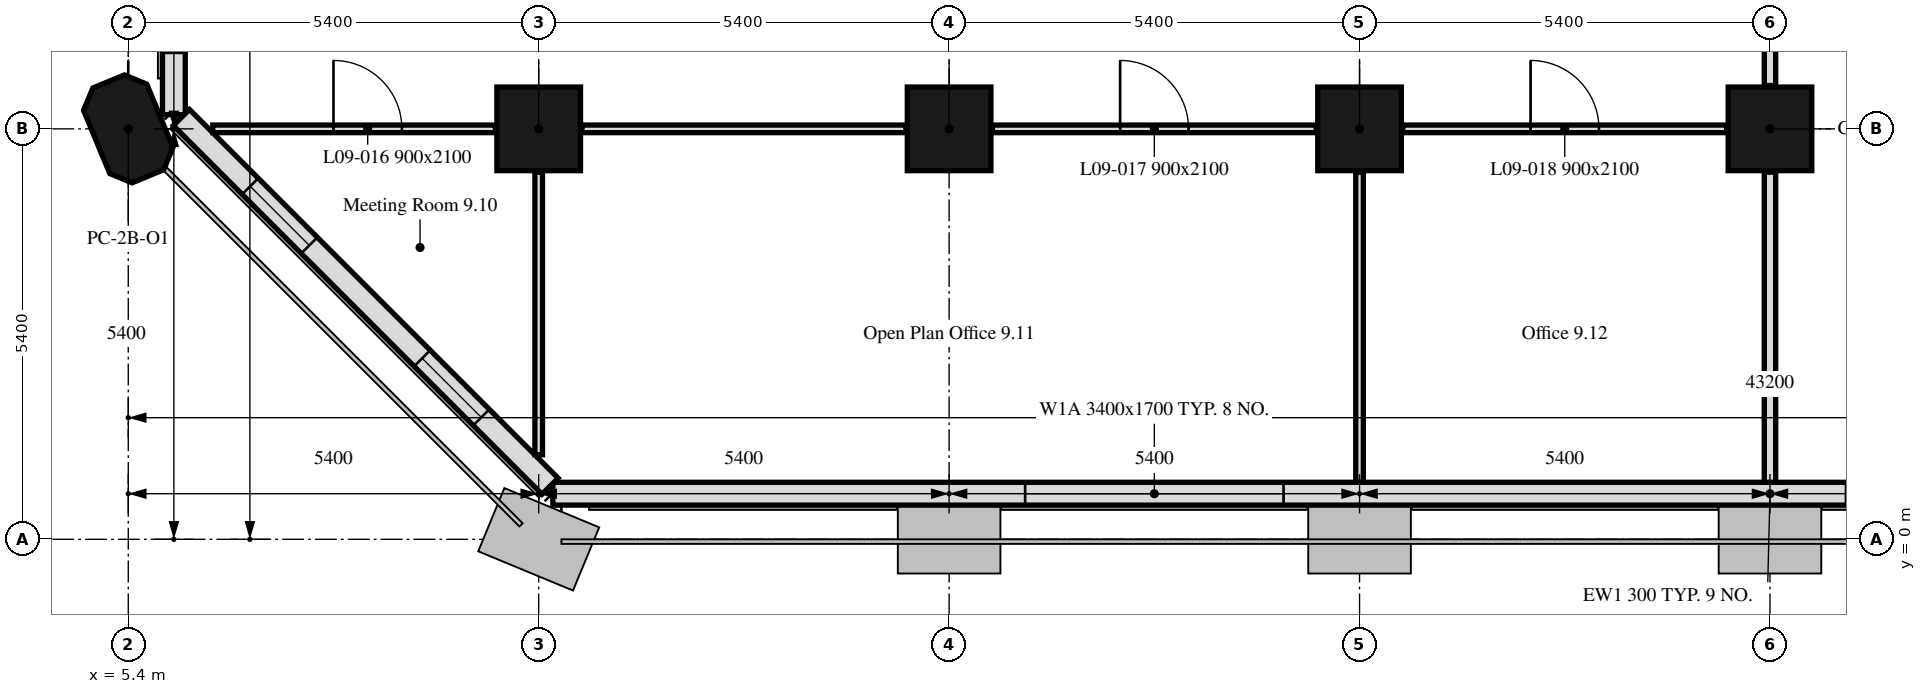
"""IFC4 building model, lengths in metres.
Left out: names, types, materials, properties, quantities, classifications, styles, units other than length and angle.
Written with IfcOpenShell. Run it as: python <this file> out.ifc"""

import sys

from ifc_helpers import new_model, si_unit, direction, frame, frame_2d, origin, origin_2d, place, context, subcontext, project, spatial, polyline, rectangle, outline, extrude, element, fill, save


model = new_model("IFC4")
c1 = context("Model", 3, precision=1e-05, world=origin(), true_north=direction((0.0, 1.0)))
c2 = subcontext(c1, "Body", "Model", "MODEL_VIEW")
j1 = project(units=[si_unit("LENGTHUNIT", "METRE"), si_unit("PLANEANGLEUNIT", "RADIAN")], contexts=[c1])
p1 = place(None, origin())
s1 = spatial("IfcSite", under=j1, at=p1, CompositionType="ELEMENT")
p2 = place(p1, origin())
s2 = spatial("IfcBuilding", under=s1, at=p2, CompositionType="ELEMENT")
p3 = place(p2, frame((0.0, 0.0, 45.0)))
s3 = spatial("IfcBuildingStorey", under=s2, at=p3, CompositionType="ELEMENT", Elevation=45.0)
p4 = place(p3, frame((5.4, 5.4, 0.0), z_axis=(0.0, 0.0, 1.0), x_axis=(-0.382683432365, 0.923879532511, 0.0)))
e1 = element("IfcColumn", 1, at=p4, inside=s3, PredefinedType="COLUMN", context=c2, shape_type="SweptSolid", body=[
    extrude(outline(polyline([(-0.45, -0.45), (0.45, -0.45), (0.675, -0.225), (0.675, 0.225), (0.45, 0.45), (-0.45, 0.45), (-0.675, 0.225), (-0.675, -0.225), (-0.45, -0.45)])), origin(), (0.0, 0.0, 1.0), 3.5),
])
for number, where, z_axis, x_axis in (
    (2, (10.8, 5.4, 0.0), (0.0, 0.0, 1.0), (1.0, 0.0, 0.0)),
    (3, (16.2, 5.4, 0.0), (0.0, 0.0, 1.0), (1.0, 0.0, 0.0)),
    (4, (21.6, 5.4, 0.0), (0.0, 0.0, 1.0), (1.0, 0.0, 0.0)),
    (5, (27.0, 5.4, 0.0), (0.0, 0.0, 1.0), (1.0, 0.0, 0.0)),
):
    element("IfcColumn", number, at=place(p3, frame(where, z_axis=z_axis, x_axis=x_axis)), inside=s3, PredefinedType="COLUMN", context=c2, shape_type="SweptSolid", body=[
        extrude(rectangle(XDim=1.1, YDim=1.1, at=origin_2d()), origin(), (0.0, 0.0, 1.0), 3.5),
    ])
p5 = place(p3, frame((10.986, 0.6, 0.0), z_axis=(0.0, 0.0, 1.0), x_axis=(1.0, 0.0, 0.0)))
e6 = element("IfcWall", 6, at=p5, inside=s3, PredefinedType="SOLIDWALL", context=c2, shape_type="SweptSolid", body=[
    extrude(rectangle(XDim=32.027, YDim=0.3, at=frame_2d((16.014, 0.0))), origin(), (0.0, 0.0, 1.0), 3.5),
])
p6 = place(p5, frame((6.214, 0.0, 0.9)))
e7 = element("IfcOpeningElement", 7, at=p6, cuts=e6, PredefinedType="OPENING", context=c2, shape_type="SweptSolid", body=[
    extrude(rectangle(XDim=3.4, YDim=1.7, at=frame_2d((1.7, 0.85))), frame((0.0, 0.16, 0.0), z_axis=(0.0, -1.0, 0.0), x_axis=(1.0, 0.0, 0.0)), (0.0, 0.0, 1.0), 0.32),
])
p7 = place(p5, frame((17.014, 0.0, 0.9)))
e8 = element("IfcOpeningElement", 8, at=p7, cuts=e6, PredefinedType="OPENING", context=c2, shape_type="SweptSolid", body=[
    extrude(rectangle(XDim=3.4, YDim=1.7, at=frame_2d((1.7, 0.85))), frame((0.0, 0.16, 0.0), z_axis=(0.0, -1.0, 0.0), x_axis=(1.0, 0.0, 0.0)), (0.0, 0.0, 1.0), 0.32),
])
p8 = place(p5, frame((27.814, 0.0, 0.9)))
e9 = element("IfcOpeningElement", 9, at=p8, cuts=e6, PredefinedType="OPENING", context=c2, shape_type="SweptSolid", body=[
    extrude(rectangle(XDim=3.4, YDim=1.7, at=frame_2d((1.7, 0.85))), frame((0.0, 0.16, 0.0), z_axis=(0.0, -1.0, 0.0), x_axis=(1.0, 0.0, 0.0)), (0.0, 0.0, 1.0), 0.32),
])
p9 = place(p3, frame((6.0, 16.2, 0.0), z_axis=(0.0, 0.0, 1.0), x_axis=(0.0, -1.0, 0.0)))
e10 = element("IfcWall", 10, at=p9, inside=s3, PredefinedType="SOLIDWALL", context=c2, shape_type="SweptSolid", body=[
    extrude(rectangle(XDim=10.614, YDim=0.3, at=frame_2d((5.307, 0.0))), origin(), (0.0, 0.0, 1.0), 3.5),
])
p10 = place(p9, frame((6.4, 0.0, 0.9)))
e11 = element("IfcOpeningElement", 11, at=p10, cuts=e10, PredefinedType="OPENING", context=c2, shape_type="SweptSolid", body=[
    extrude(rectangle(XDim=3.4, YDim=1.7, at=frame_2d((1.7, 0.85))), frame((0.0, 0.16, 0.0), z_axis=(0.0, -1.0, 0.0), x_axis=(1.0, 0.0, 0.0)), (0.0, 0.0, 1.0), 0.32),
])
p11 = place(p3, frame((6.099, 5.55, 0.0), z_axis=(0.0, 0.0, 1.0), x_axis=(0.707106781187, -0.707106781187, 0.0)))
e12 = element("IfcWall", 12, at=p11, inside=s3, PredefinedType="SOLIDWALL", context=c2, shape_type="SweptSolid", body=[
    extrude(rectangle(XDim=6.86, YDim=0.3, at=frame_2d((3.43, 0.0))), origin(), (0.0, 0.0, 1.0), 3.5),
])
p12 = place(p11, frame((1.28, 0.0, 0.9)))
e13 = element("IfcOpeningElement", 13, at=p12, cuts=e12, PredefinedType="OPENING", context=c2, shape_type="SweptSolid", body=[
    extrude(rectangle(XDim=1.1, YDim=1.7, at=frame_2d((0.55, 0.85))), frame((0.0, 0.16, 0.0), z_axis=(0.0, -1.0, 0.0), x_axis=(1.0, 0.0, 0.0)), (0.0, 0.0, 1.0), 0.32),
])
p13 = place(p11, frame((4.48, 0.0, 0.9)))
e14 = element("IfcOpeningElement", 14, at=p13, cuts=e12, PredefinedType="OPENING", context=c2, shape_type="SweptSolid", body=[
    extrude(rectangle(XDim=1.1, YDim=1.7, at=frame_2d((0.55, 0.85))), frame((0.0, 0.16, 0.0), z_axis=(0.0, -1.0, 0.0), x_axis=(1.0, 0.0, 0.0)), (0.0, 0.0, 1.0), 0.32),
])
p14 = place(p3, frame((6.512, 5.4, 0.0), z_axis=(0.0, 0.0, 1.0), x_axis=(1.0, 0.0, 0.0)))
e15 = element("IfcWall", 15, at=p14, inside=s3, PredefinedType="PARTITIONING", context=c2, shape_type="SweptSolid", body=[
    extrude(rectangle(XDim=3.718, YDim=0.1, at=frame_2d((1.859, 0.0))), origin(), (0.0, 0.0, 1.0), 3.5),
])
p15 = place(p14, frame((1.588, 0.0, 0.0)))
e16 = element("IfcOpeningElement", 16, at=p15, cuts=e15, PredefinedType="OPENING", context=c2, shape_type="SweptSolid", body=[
    extrude(rectangle(XDim=0.9, YDim=2.1, at=frame_2d((0.45, 1.05))), frame((0.0, 0.05, 0.0), z_axis=(0.0, -1.0, 0.0), x_axis=(1.0, 0.0, 0.0)), (0.0, 0.0, 1.0), 0.1),
])
p16 = place(p3, frame((11.37, 5.4, 0.0), z_axis=(0.0, 0.0, 1.0), x_axis=(1.0, 0.0, 0.0)))
e17 = element("IfcWall", 17, at=p16, inside=s3, PredefinedType="PARTITIONING", context=c2, shape_type="SweptSolid", body=[
    extrude(rectangle(XDim=4.26, YDim=0.1, at=frame_2d((2.13, 0.0))), origin(), (0.0, 0.0, 1.0), 3.5),
])
p17 = place(p3, frame((16.77, 5.4, 0.0), z_axis=(0.0, 0.0, 1.0), x_axis=(1.0, 0.0, 0.0)))
e18 = element("IfcWall", 18, at=p17, inside=s3, PredefinedType="PARTITIONING", context=c2, shape_type="SweptSolid", body=[
    extrude(rectangle(XDim=4.26, YDim=0.1, at=frame_2d((2.13, 0.0))), origin(), (0.0, 0.0, 1.0), 3.5),
])
p18 = place(p17, frame((1.68, 0.0, 0.0)))
e19 = element("IfcOpeningElement", 19, at=p18, cuts=e18, PredefinedType="OPENING", context=c2, shape_type="SweptSolid", body=[
    extrude(rectangle(XDim=0.9, YDim=2.1, at=frame_2d((0.45, 1.05))), frame((0.0, 0.05, 0.0), z_axis=(0.0, -1.0, 0.0), x_axis=(1.0, 0.0, 0.0)), (0.0, 0.0, 1.0), 0.1),
])
p19 = place(p3, frame((22.17, 5.4, 0.0), z_axis=(0.0, 0.0, 1.0), x_axis=(1.0, 0.0, 0.0)))
e20 = element("IfcWall", 20, at=p19, inside=s3, PredefinedType="PARTITIONING", context=c2, shape_type="SweptSolid", body=[
    extrude(rectangle(XDim=4.26, YDim=0.1, at=frame_2d((2.13, 0.0))), origin(), (0.0, 0.0, 1.0), 3.5),
])
p20 = place(p19, frame((1.68, 0.0, 0.0)))
e21 = element("IfcOpeningElement", 21, at=p20, cuts=e20, PredefinedType="OPENING", context=c2, shape_type="SweptSolid", body=[
    extrude(rectangle(XDim=0.9, YDim=2.1, at=frame_2d((0.45, 1.05))), frame((0.0, 0.05, 0.0), z_axis=(0.0, -1.0, 0.0), x_axis=(1.0, 0.0, 0.0)), (0.0, 0.0, 1.0), 0.1),
])
p21 = place(p3, frame((27.0, 5.97, 0.0), z_axis=(0.0, 0.0, 1.0), x_axis=(0.0, 1.0, 0.0)))
e22 = element("IfcWall", 22, at=p21, inside=s3, PredefinedType="PARTITIONING", context=c2, shape_type="SweptSolid", body=[
    extrude(rectangle(XDim=4.26, YDim=0.15, at=frame_2d((2.13, 0.0))), origin(), (0.0, 0.0, 1.0), 2.75),
])
p22 = place(p3, frame((10.8, 1.112, 0.0), z_axis=(0.0, 0.0, 1.0), x_axis=(0.0, 1.0, 0.0)))
e23 = element("IfcWall", 23, at=p22, inside=s3, PredefinedType="PARTITIONING", context=c2, shape_type="SweptSolid", body=[
    extrude(rectangle(XDim=3.718, YDim=0.1, at=frame_2d((1.859, 0.0))), origin(), (0.0, 0.0, 1.0), 3.5),
])
p23 = place(p3, frame((21.6, 0.751, 0.0), z_axis=(0.0, 0.0, 1.0), x_axis=(0.0, 1.0, 0.0)))
e24 = element("IfcWall", 24, at=p23, inside=s3, PredefinedType="PARTITIONING", context=c2, shape_type="SweptSolid", body=[
    extrude(rectangle(XDim=4.079, YDim=0.1, at=frame_2d((2.04, 0.0))), origin(), (0.0, 0.0, 1.0), 2.75),
])
p24 = place(p3, frame((27.0, 0.751, 0.0), z_axis=(0.0, 0.0, 1.0), x_axis=(0.0, 1.0, 0.0)))
e25 = element("IfcWall", 25, at=p24, inside=s3, PredefinedType="PARTITIONING", context=c2, shape_type="SweptSolid", body=[
    extrude(rectangle(XDim=4.079, YDim=0.15, at=frame_2d((2.04, 0.0))), origin(), (0.0, 0.0, 1.0), 2.75),
])
p25 = place(p6, origin())
e26 = element("IfcWindow", 26, at=p25, inside=s3, PartitioningType="SINGLE_PANEL", PredefinedType="WINDOW", context=c2, shape_type="SweptSolid", body=[
    extrude(rectangle(XDim=3.4, YDim=1.7, at=frame_2d((1.7, 0.85))), frame((0.0, 0.03, 0.0), z_axis=(0.0, -1.0, 0.0), x_axis=(1.0, 0.0, 0.0)), (0.0, 0.0, 1.0), 0.06),
])
fill(e7, e26)
p26 = place(p12, origin())
e27 = element("IfcWindow", 27, at=p26, inside=s3, PartitioningType="SINGLE_PANEL", PredefinedType="WINDOW", context=c2, shape_type="SweptSolid", body=[
    extrude(rectangle(XDim=1.1, YDim=1.7, at=frame_2d((0.55, 0.85))), frame((0.0, 0.03, 0.0), z_axis=(0.0, -1.0, 0.0), x_axis=(1.0, 0.0, 0.0)), (0.0, 0.0, 1.0), 0.06),
])
fill(e13, e27)
p27 = place(p13, origin())
e28 = element("IfcWindow", 28, at=p27, inside=s3, PartitioningType="SINGLE_PANEL", PredefinedType="WINDOW", context=c2, shape_type="SweptSolid", body=[
    extrude(rectangle(XDim=1.1, YDim=1.7, at=frame_2d((0.55, 0.85))), frame((0.0, 0.03, 0.0), z_axis=(0.0, -1.0, 0.0), x_axis=(1.0, 0.0, 0.0)), (0.0, 0.0, 1.0), 0.06),
])
fill(e14, e28)
p28 = place(p15, origin())
e29 = element("IfcDoor", 29, at=p28, inside=s3, OperationType="SINGLE_SWING_LEFT", PredefinedType="DOOR", context=c2, shape_type="SweptSolid", body=[
    extrude(rectangle(XDim=0.9, YDim=2.1, at=frame_2d((0.45, 1.05))), frame((0.0, 0.025, 0.0), z_axis=(0.0, -1.0, 0.0), x_axis=(1.0, 0.0, 0.0)), (0.0, 0.0, 1.0), 0.05),
])
fill(e16, e29)
p29 = place(p18, origin())
e30 = element("IfcDoor", 30, at=p29, inside=s3, OperationType="SINGLE_SWING_LEFT", PredefinedType="DOOR", context=c2, shape_type="SweptSolid", body=[
    extrude(rectangle(XDim=0.9, YDim=2.1, at=frame_2d((0.45, 1.05))), frame((0.0, 0.025, 0.0), z_axis=(0.0, -1.0, 0.0), x_axis=(1.0, 0.0, 0.0)), (0.0, 0.0, 1.0), 0.05),
])
fill(e19, e30)
p30 = place(p20, origin())
e31 = element("IfcDoor", 31, at=p30, inside=s3, OperationType="SINGLE_SWING_LEFT", PredefinedType="DOOR", context=c2, shape_type="SweptSolid", body=[
    extrude(rectangle(XDim=0.9, YDim=2.1, at=frame_2d((0.45, 1.05))), frame((0.0, 0.025, 0.0), z_axis=(0.0, -1.0, 0.0), x_axis=(1.0, 0.0, 0.0)), (0.0, 0.0, 1.0), 0.05),
])
fill(e21, e31)
save(model, sys.argv[1])
